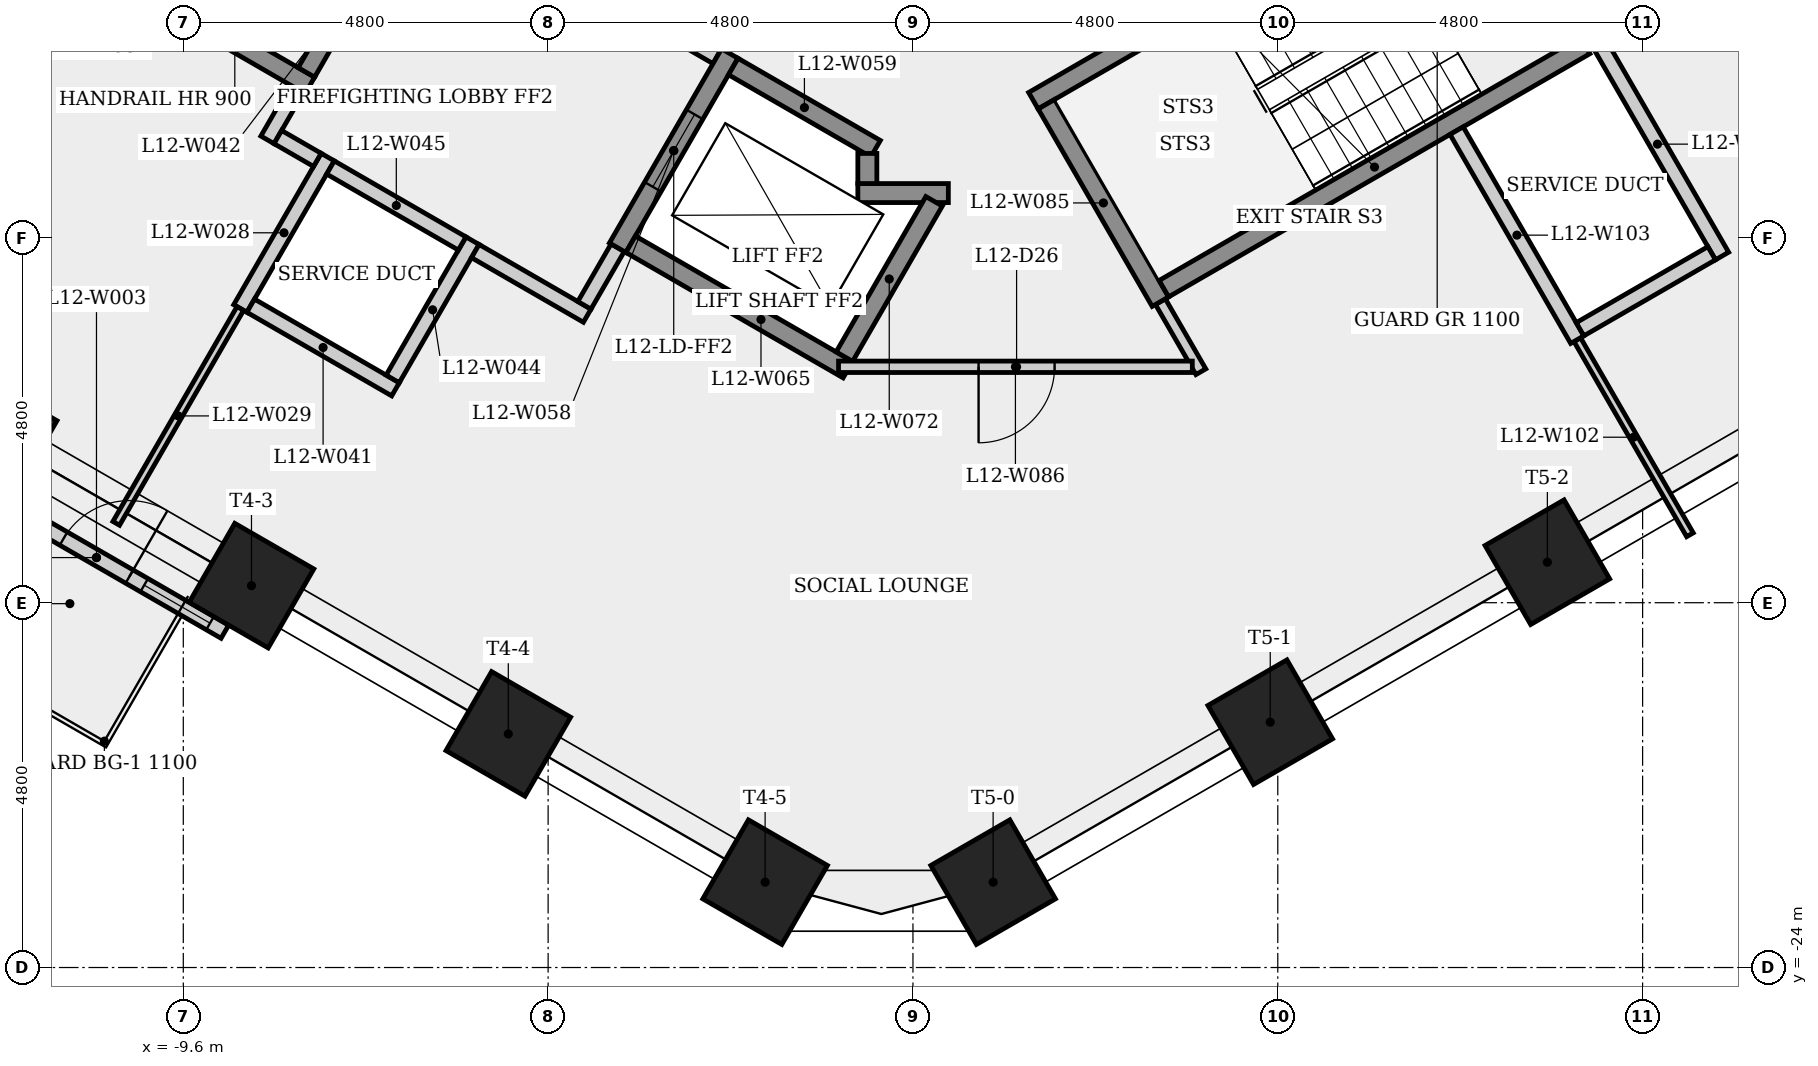
"""IFC4 building model, lengths in metres.
Left out: names, types, materials, properties, quantities, classifications, styles, units other than length and angle.
Written with IfcOpenShell. Run it as: python <this file> out.ifc"""

import sys

from ifc_helpers import new_model, si_unit, direction, frame, frame_2d, origin, origin_2d, place, context, subcontext, project, spatial, rectangle, extrude, element, fill, save


model = new_model("IFC4")
c1 = context("Model", 3, precision=1e-05, world=origin(), true_north=direction((0.0, 1.0)))
c2 = subcontext(c1, "Body", "Model", "MODEL_VIEW")
j1 = project(units=[si_unit("LENGTHUNIT", "METRE"), si_unit("PLANEANGLEUNIT", "RADIAN")], contexts=[c1])
p1 = place(None, origin())
s1 = spatial("IfcSite", under=j1, at=p1, CompositionType="ELEMENT")
p2 = place(p1, origin())
s2 = spatial("IfcBuilding", under=s1, at=p2, CompositionType="ELEMENT")
p3 = place(p2, frame((0.0, 0.0, 49.3)))
s3 = spatial("IfcBuildingStorey", under=s2, at=p3, CompositionType="ELEMENT", Elevation=49.3)
for number, where, z_axis, x_axis in (
    (1, (-12.082, -17.025, 0.0), (0.0, 0.0, 1.0), (-0.5, -0.866, 0.0)),
    (2, (-8.703, -18.975, 0.0), (0.0, 0.0, 1.0), (-0.5, -0.866, 0.0)),
    (3, (-5.324, -20.926, 0.0), (0.0, 0.0, 1.0), (-0.5, -0.866, 0.0)),
    (4, (-1.945, -22.877, 0.0), (0.0, 0.0, 1.0), (-0.5, -0.866, 0.0)),
    (5, (1.055, -22.877, 0.0), (0.0, 0.0, 1.0), (0.5, -0.866, 0.0)),
    (6, (4.701, -20.772, 0.0), (0.0, 0.0, 1.0), (0.5, -0.866, 0.0)),
    (7, (8.347, -18.667, 0.0), (0.0, 0.0, 1.0), (0.5, -0.866, 0.0)),
):
    element("IfcColumn", number, at=place(p3, frame(where, z_axis=z_axis, x_axis=x_axis)), inside=s3, PredefinedType="COLUMN", context=c2, shape_type="SweptSolid", body=[
        extrude(rectangle(XDim=1.2, YDim=1.2, at=origin_2d()), origin(), (0.0, 0.0, 1.0), 3.4),
    ])
p4 = place(p3, frame((-12.431, -17.631, 0.0), z_axis=(0.0, 0.0, 1.0), x_axis=(0.86603551244, -0.499982490886, 0.0)))
e8 = element("IfcWall", 8, at=p4, inside=s3, PredefinedType="SOLIDWALL", context=c2, shape_type="SweptSolid", body=[
    extrude(rectangle(XDim=3.901, YDim=0.2, at=frame_2d((1.951, 0.0))), origin(), (0.0, 0.0, 1.0), 3.4),
])
p5 = place(p4, frame((1.45, 0.0, 0.0)))
e9 = element("IfcOpeningElement", 9, at=p5, cuts=e8, PredefinedType="OPENING", context=c2, shape_type="SweptSolid", body=[
    extrude(rectangle(XDim=1.0, YDim=2.4, at=frame_2d((0.5, 1.2))), frame((0.0, 0.11, 0.0), z_axis=(0.0, -1.0, 0.0), x_axis=(1.0, 0.0, 0.0)), (0.0, 0.0, 1.0), 0.22),
])
p6 = place(p4, frame((0.225, 0.0, 0.9)))
e10 = element("IfcOpeningElement", 10, at=p6, cuts=e8, PredefinedType="OPENING", context=c2, shape_type="SweptSolid", body=[
    extrude(rectangle(XDim=1.0, YDim=1.5, at=frame_2d((0.5, 0.75))), frame((0.0, 0.11, 0.0), z_axis=(0.0, -1.0, 0.0), x_axis=(1.0, 0.0, 0.0)), (0.0, 0.0, 1.0), 0.22),
])
p7 = place(p4, frame((2.676, 0.0, 0.9)))
e11 = element("IfcOpeningElement", 11, at=p7, cuts=e8, PredefinedType="OPENING", context=c2, shape_type="SweptSolid", body=[
    extrude(rectangle(XDim=1.0, YDim=1.5, at=frame_2d((0.5, 0.75))), frame((0.0, 0.11, 0.0), z_axis=(0.0, -1.0, 0.0), x_axis=(1.0, 0.0, 0.0)), (0.0, 0.0, 1.0), 0.22),
])
p8 = place(p3, frame((-8.85, -15.329, 0.0), z_axis=(0.0, 0.0, 1.0), x_axis=(0.500077740698, 0.865980515519, 0.0)))
e12 = element("IfcWall", 12, at=p8, inside=s3, PredefinedType="PLUMBINGWALL", context=c2, shape_type="SweptSolid", body=[
    extrude(rectangle(XDim=2.3, YDim=0.2, at=frame_2d((1.15, 0.0))), origin(), (0.0, 0.0, 1.0), 3.05),
])
p9 = place(p3, frame((-8.85, -15.329, 0.0), z_axis=(0.0, 0.0, 1.0), x_axis=(-0.499983540639, -0.866034906392, 0.0)))
e13 = element("IfcWall", 13, at=p9, inside=s3, PredefinedType="PARTITIONING", context=c2, shape_type="SweptSolid", body=[
    extrude(rectangle(XDim=3.265, YDim=0.1, at=frame_2d((1.632, 0.0))), origin(), (0.0, 0.0, 1.0), 3.05),
])
p10 = place(p3, frame((-8.493, -13.11, 0.0), z_axis=(0.0, 0.0, 1.0), x_axis=(0.500067724834, 0.865986299303, 0.0)))
e14 = element("IfcWall", 14, at=p10, inside=s3, PredefinedType="PARTITIONING", context=c2, shape_type="SweptSolid", body=[
    extrude(rectangle(XDim=0.775, YDim=0.2, at=frame_2d((0.388, 0.0))), origin(), (0.0, 0.0, 1.0), 3.05),
])
p11 = place(p3, frame((-7.935, -12.393, 0.0), z_axis=(0.0, 0.0, 1.0), x_axis=(-0.866025499775, 0.499999833739, 0.0)))
e15 = element("IfcWall", 15, at=p11, inside=s3, PredefinedType="SHEAR", context=c2, shape_type="SweptSolid", body=[
    extrude(rectangle(XDim=6.4, YDim=0.25, at=frame_2d((3.2, 0.0))), origin(), (0.0, 0.0, 1.0), 3.05),
])
p12 = place(p3, frame((-7.836, -13.373, 0.0), z_axis=(0.0, 0.0, 1.0), x_axis=(-0.866232998003, 0.499640263761, 0.0)))
e16 = element("IfcWall", 16, at=p12, inside=s3, PredefinedType="PARTITIONING", context=c2, shape_type="SweptSolid", body=[
    extrude(rectangle(XDim=0.6, YDim=0.2, at=frame_2d((0.3, 0.0))), origin(), (0.0, 0.0, 1.0), 3.05),
])
p13 = place(p3, frame((-6.808, -16.392, 0.0), z_axis=(0.0, 0.0, 1.0), x_axis=(-0.866008176907, 0.50002983664, 0.0)))
e17 = element("IfcWall", 17, at=p13, inside=s3, PredefinedType="PLUMBINGWALL", context=c2, shape_type="SweptSolid", body=[
    extrude(rectangle(XDim=2.2, YDim=0.2, at=frame_2d((1.1, 0.0))), origin(), (0.0, 0.0, 1.0), 3.05),
])
p14 = place(p3, frame((-6.605, -9.841, 0.0), z_axis=(0.0, 0.0, 1.0), x_axis=(-0.499996545922, -0.866027397988, 0.0)))
e18 = element("IfcWall", 18, at=p14, inside=s3, PredefinedType="SHEAR", context=c2, shape_type="SweptSolid", body=[
    extrude(rectangle(XDim=2.75, YDim=0.25, at=frame_2d((1.375, 0.0))), origin(), (0.0, 0.0, 1.0), 3.05),
])
p15 = place(p14, frame((0.875, 0.0, 0.0)))
e19 = element("IfcOpeningElement", 19, at=p15, cuts=e18, PredefinedType="OPENING", context=c2, shape_type="SweptSolid", body=[
    extrude(rectangle(XDim=1.0, YDim=2.1, at=frame_2d((0.5, 1.05))), frame((0.0, 0.135, 0.0), z_axis=(0.0, -1.0, 0.0), x_axis=(1.0, 0.0, 0.0)), (0.0, 0.0, 1.0), 0.27),
])
p16 = place(p3, frame((-6.435, -9.795, 0.0), z_axis=(0.0, 0.0, 1.0), x_axis=(0.866012907634, -0.500021643343, 0.0)))
e20 = element("IfcWall", 20, at=p16, inside=s3, PredefinedType="PARTITIONING", context=c2, shape_type="SweptSolid", body=[
    extrude(rectangle(XDim=4.45, YDim=0.2, at=frame_2d((2.225, 0.0))), origin(), (0.0, 0.0, 1.0), 3.05),
])
p17 = place(p16, frame((1.675, 0.0, 0.0)))
e21 = element("IfcOpeningElement", 21, at=p17, cuts=e20, PredefinedType="OPENING", context=c2, shape_type="SweptSolid", body=[
    extrude(rectangle(XDim=1.1, YDim=2.1, at=frame_2d((0.55, 1.05))), frame((0.0, 0.11, 0.0), z_axis=(0.0, -1.0, 0.0), x_axis=(1.0, 0.0, 0.0)), (0.0, 0.0, 1.0), 0.22),
])
p18 = place(p3, frame((-5.795, -14.437, 0.0), z_axis=(0.0, 0.0, 1.0), x_axis=(-0.500027713859, -0.866009402589, 0.0)))
e22 = element("IfcWall", 22, at=p18, inside=s3, PredefinedType="PLUMBINGWALL", context=c2, shape_type="SweptSolid", body=[
    extrude(rectangle(XDim=2.1, YDim=0.2, at=frame_2d((1.05, 0.0))), origin(), (0.0, 0.0, 1.0), 3.05),
])
p19 = place(p3, frame((-5.931, -14.473, 0.0), z_axis=(0.0, 0.0, 1.0), x_axis=(-0.866041268327, 0.499972520799, 0.0)))
e23 = element("IfcWall", 23, at=p19, inside=s3, PredefinedType="PLUMBINGWALL", context=c2, shape_type="SweptSolid", body=[
    extrude(rectangle(XDim=2.0, YDim=0.2, at=frame_2d((1.0, 0.0))), origin(), (0.0, 0.0, 1.0), 3.05),
])
p20 = place(p3, frame((-4.286, -15.423, 0.0), z_axis=(0.0, 0.0, 1.0), x_axis=(-0.866025371046, 0.500000056704, 0.0)))
e24 = element("IfcWall", 24, at=p20, inside=s3, PredefinedType="PARTITIONING", context=c2, shape_type="SweptSolid", body=[
    extrude(rectangle(XDim=1.7, YDim=0.2, at=frame_2d((0.85, 0.0))), origin(), (0.0, 0.0, 1.0), 3.05),
])
p21 = place(p3, frame((-3.885, -14.529, 0.0), z_axis=(0.0, 0.0, 1.0), x_axis=(-0.499859285417, -0.866106630146, 0.0)))
e25 = element("IfcWall", 25, at=p21, inside=s3, PredefinedType="PARTITIONING", context=c2, shape_type="SweptSolid", body=[
    extrude(rectangle(XDim=0.875, YDim=0.2, at=frame_2d((0.438, 0.0))), origin(), (0.0, 0.0, 1.0), 3.05),
])
p22 = place(p3, frame((-2.41, -11.974, 0.0), z_axis=(0.0, 0.0, 1.0), x_axis=(-0.500001826776, -0.866024349092, 0.0)))
e26 = element("IfcWall", 26, at=p22, inside=s3, PredefinedType="SHEAR", context=c2, shape_type="SweptSolid", body=[
    extrude(rectangle(XDim=2.95, YDim=0.25, at=frame_2d((1.475, 0.0))), origin(), (0.0, 0.0, 1.0), 3.05),
])
p23 = place(p22, frame((0.925, 0.0, 0.0)))
e27 = element("IfcOpeningElement", 27, at=p23, cuts=e26, PredefinedType="OPENING", context=c2, shape_type="SweptSolid", body=[
    extrude(rectangle(XDim=1.1, YDim=2.1, at=frame_2d((0.55, 1.05))), frame((0.0, 0.135, 0.0), z_axis=(0.0, -1.0, 0.0), x_axis=(1.0, 0.0, 0.0)), (0.0, 0.0, 1.0), 0.27),
])
p24 = place(p3, frame((-2.364, -12.145, 0.0), z_axis=(0.0, 0.0, 1.0), x_axis=(0.86603892542, -0.499976579108, 0.0)))
e28 = element("IfcWall", 28, at=p24, inside=s3, PredefinedType="SHEAR", context=c2, shape_type="SweptSolid", body=[
    extrude(rectangle(XDim=2.162, YDim=0.25, at=frame_2d((1.081, 0.0))), origin(), (0.0, 0.0, 1.0), 3.05),
])
p25 = place(p3, frame((-0.856, -16.133, 0.0), z_axis=(0.0, 0.0, 1.0), x_axis=(-0.866021716278, 0.500006386895, 0.0)))
e29 = element("IfcWall", 29, at=p25, inside=s3, PredefinedType="SHEAR", context=c2, shape_type="SweptSolid", body=[
    extrude(rectangle(XDim=3.3, YDim=0.25, at=frame_2d((1.65, 0.0))), origin(), (0.0, 0.0, 1.0), 3.05),
])
p26 = place(p3, frame((-0.725, -13.81, 0.0), z_axis=(0.0, 0.0, 1.0), x_axis=(1.0, 0.0, 0.0)))
e30 = element("IfcWall", 30, at=p26, inside=s3, PredefinedType="SHEAR", context=c2, shape_type="SweptSolid", body=[
    extrude(rectangle(XDim=1.191, YDim=0.25, at=frame_2d((0.595, 0.0))), origin(), (0.0, 0.0, 1.0), 3.05),
])
p27 = place(p3, frame((-0.6, -13.289, 0.0), z_axis=(0.0, 0.0, 1.0), x_axis=(0.0, -1.0, 0.0)))
e31 = element("IfcWall", 31, at=p27, inside=s3, PredefinedType="SHEAR", context=c2, shape_type="SweptSolid", body=[
    extrude(rectangle(XDim=0.396, YDim=0.25, at=frame_2d((0.198, 0.0))), origin(), (0.0, 0.0, 1.0), 3.4),
])
p28 = place(p3, frame((0.278, -13.918, 0.0), z_axis=(0.0, 0.0, 1.0), x_axis=(-0.49998806882, -0.866032292145, 0.0)))
e32 = element("IfcWall", 32, at=p28, inside=s3, PredefinedType="SHEAR", context=c2, shape_type="SweptSolid", body=[
    extrude(rectangle(XDim=2.36, YDim=0.25, at=frame_2d((1.18, 0.0))), origin(), (0.0, 0.0, 1.0), 3.4),
])
p29 = place(p3, frame((1.585, -12.595, 0.0), z_axis=(0.0, 0.0, 1.0), x_axis=(0.866036417653, 0.499980922934, 0.0)))
e33 = element("IfcWall", 33, at=p29, inside=s3, PredefinedType="SHEAR", context=c2, shape_type="SweptSolid", body=[
    extrude(rectangle(XDim=6.65, YDim=0.25, at=frame_2d((3.325, 0.0))), origin(), (0.0, 0.0, 1.0), 3.05),
])
p30 = place(p29, frame((5.275, 0.0, 0.0)))
e34 = element("IfcOpeningElement", 34, at=p30, cuts=e33, PredefinedType="OPENING", context=c2, shape_type="SweptSolid", body=[
    extrude(rectangle(XDim=1.0, YDim=2.1, at=frame_2d((0.5, 1.05))), frame((0.0, 0.135, 0.0), z_axis=(0.0, -1.0, 0.0), x_axis=(1.0, 0.0, 0.0)), (0.0, 0.0, 1.0), 0.27),
])
p31 = place(p3, frame((3.256, -15.239, 0.0), z_axis=(0.0, 0.0, 1.0), x_axis=(0.500059846627, -0.865990848561, 0.0)))
e35 = element("IfcWall", 35, at=p31, inside=s3, PredefinedType="PARTITIONING", context=c2, shape_type="SweptSolid", body=[
    extrude(rectangle(XDim=1.065, YDim=0.15, at=frame_2d((0.532, 0.0))), origin(), (0.0, 0.0, 1.0), 3.05),
])
p32 = place(p3, frame((3.256, -15.239, 0.0), z_axis=(0.0, 0.0, 1.0), x_axis=(-0.50002537861, 0.866010750942, 0.0)))
e36 = element("IfcWall", 36, at=p32, inside=s3, PredefinedType="SHEAR", context=c2, shape_type="SweptSolid", body=[
    extrude(rectangle(XDim=3.0, YDim=0.25, at=frame_2d((1.5, 0.0))), origin(), (0.0, 0.0, 1.0), 3.05),
])
p33 = place(p3, frame((3.676, -16.096, 0.0), z_axis=(0.0, 0.0, 1.0), x_axis=(-1.0, 0.0, 0.0)))
e37 = element("IfcWall", 37, at=p33, inside=s3, PredefinedType="PARTITIONING", context=c2, shape_type="SweptSolid", body=[
    extrude(rectangle(XDim=4.655, YDim=0.15, at=frame_2d((2.327, 0.0))), origin(), (0.0, 0.0, 1.0), 3.05),
])
p34 = place(p33, frame((1.812, 0.0, 0.0)))
e38 = element("IfcOpeningElement", 38, at=p34, cuts=e37, PredefinedType="OPENING", context=c2, shape_type="SweptSolid", body=[
    extrude(rectangle(XDim=1.0, YDim=2.1, at=frame_2d((0.5, 1.05))), frame((0.0, 0.085, 0.0), z_axis=(0.0, -1.0, 0.0), x_axis=(1.0, 0.0, 0.0)), (0.0, 0.0, 1.0), 0.17),
])
p35 = place(p3, frame((3.301, -15.068, 0.0), z_axis=(0.0, 0.0, 1.0), x_axis=(0.866035036182, 0.499983315828, 0.0)))
e39 = element("IfcWall", 39, at=p35, inside=s3, PredefinedType="SHEAR", context=c2, shape_type="SweptSolid", body=[
    extrude(rectangle(XDim=6.4, YDim=0.25, at=frame_2d((3.2, 0.0))), origin(), (0.0, 0.0, 1.0), 3.05),
])
p36 = place(p3, frame((8.74, -15.738, 0.0), z_axis=(0.0, 0.0, 1.0), x_axis=(0.500052637874, -0.865995011161, 0.0)))
e40 = element("IfcWall", 40, at=p36, inside=s3, PredefinedType="PARTITIONING", context=c2, shape_type="SweptSolid", body=[
    extrude(rectangle(XDim=2.966, YDim=0.1, at=frame_2d((1.483, 0.0))), origin(), (0.0, 0.0, 1.0), 3.05),
])
p37 = place(p3, frame((8.74, -15.739, 0.0), z_axis=(0.0, 0.0, 1.0), x_axis=(-0.500017526161, 0.866015284814, 0.0)))
e41 = element("IfcWall", 41, at=p37, inside=s3, PredefinedType="PLUMBINGWALL", context=c2, shape_type="SweptSolid", body=[
    extrude(rectangle(XDim=3.175, YDim=0.2, at=frame_2d((1.588, 0.0))), origin(), (0.0, 0.0, 1.0), 3.05),
])
p38 = place(p3, frame((8.945, -11.694, 0.0), z_axis=(0.0, 0.0, 1.0), x_axis=(0.500062241894, -0.865989465428, 0.0)))
e42 = element("IfcWall", 42, at=p38, inside=s3, PredefinedType="PLUMBINGWALL", context=c2, shape_type="SweptSolid", body=[
    extrude(rectangle(XDim=3.4, YDim=0.2, at=frame_2d((1.7, 0.0))), origin(), (0.0, 0.0, 1.0), 3.05),
])
p39 = place(p3, frame((10.509, -14.602, 0.0), z_axis=(0.0, 0.0, 1.0), x_axis=(-0.866010750942, -0.50002537861, 0.0)))
e43 = element("IfcWall", 43, at=p39, inside=s3, PredefinedType="PLUMBINGWALL", context=c2, shape_type="SweptSolid", body=[
    extrude(rectangle(XDim=2.0, YDim=0.2, at=frame_2d((1.0, 0.0))), origin(), (0.0, 0.0, 1.0), 3.05),
])
p40 = place(p5, origin())
e44 = element("IfcDoor", 44, at=p40, inside=s3, OperationType="SINGLE_SWING_RIGHT", PredefinedType="DOOR", context=c2, shape_type="SweptSolid", body=[
    extrude(rectangle(XDim=1.0, YDim=2.4, at=frame_2d((0.5, 1.2))), frame((0.0, 0.025, 0.0), z_axis=(0.0, -1.0, 0.0), x_axis=(1.0, 0.0, 0.0)), (0.0, 0.0, 1.0), 0.05),
])
fill(e9, e44)
p41 = place(p7, origin())
e45 = element("IfcWindow", 45, at=p41, inside=s3, PartitioningType="SINGLE_PANEL", PredefinedType="WINDOW", context=c2, shape_type="SweptSolid", body=[
    extrude(rectangle(XDim=1.0, YDim=1.5, at=frame_2d((0.5, 0.75))), frame((0.0, 0.03, 0.0), z_axis=(0.0, -1.0, 0.0), x_axis=(1.0, 0.0, 0.0)), (0.0, 0.0, 1.0), 0.06),
])
fill(e11, e45)
p42 = place(p23, origin())
e46 = element("IfcDoor", 46, at=p42, inside=s3, OperationType="SLIDING_TO_LEFT", PredefinedType="DOOR", context=c2, shape_type="SweptSolid", body=[
    extrude(rectangle(XDim=1.1, YDim=2.1, at=frame_2d((0.55, 1.05))), frame((0.0, 0.025, 0.0), z_axis=(0.0, -1.0, 0.0), x_axis=(1.0, 0.0, 0.0)), (0.0, 0.0, 1.0), 0.05),
])
fill(e27, e46)
p43 = place(p34, origin())
e47 = element("IfcDoor", 47, at=p43, inside=s3, OperationType="SINGLE_SWING_RIGHT", PredefinedType="DOOR", context=c2, shape_type="SweptSolid", body=[
    extrude(rectangle(XDim=1.0, YDim=2.1, at=frame_2d((0.5, 1.05))), frame((0.0, 0.025, 0.0), z_axis=(0.0, -1.0, 0.0), x_axis=(1.0, 0.0, 0.0)), (0.0, 0.0, 1.0), 0.05),
])
fill(e38, e47)
save(model, sys.argv[1])
